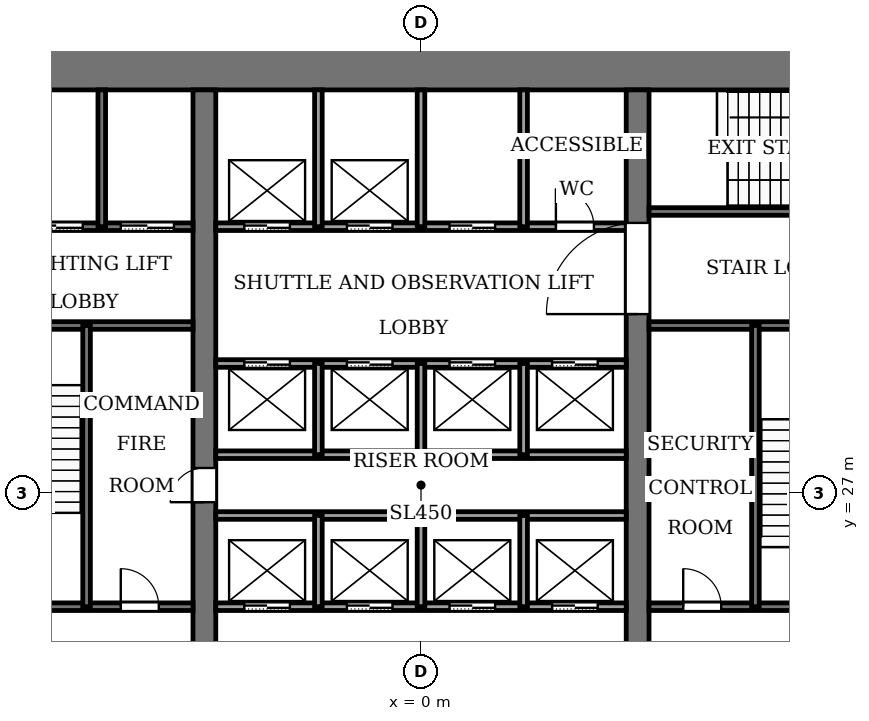
"""IFC4 building model, lengths in metres.
Left out: names, types, materials, properties, quantities, classifications, styles, units other than length and angle.
Written with IfcOpenShell. Run it as: python <this file> out.ifc"""

import sys

from ifc_helpers import new_model, si_unit, direction, frame, frame_2d, origin, place, context, subcontext, project, spatial, rectangle, extrude, element, fill, save


model = new_model("IFC4")
c1 = context("Model", 3, precision=1e-05, world=origin(), true_north=direction((0.0, 1.0)))
c2 = subcontext(c1, "Body", "Model", "MODEL_VIEW")
j1 = project(units=[si_unit("LENGTHUNIT", "METRE"), si_unit("PLANEANGLEUNIT", "RADIAN")], contexts=[c1])
p1 = place(None, origin())
s1 = spatial("IfcSite", under=j1, at=p1, CompositionType="ELEMENT")
p2 = place(p1, origin())
s2 = spatial("IfcBuilding", under=s1, at=p2, CompositionType="ELEMENT")
p3 = place(p2, origin())
s3 = spatial("IfcBuildingStorey", under=s2, at=p3, CompositionType="ELEMENT", Elevation=0.0)
p4 = place(p3, frame((-14.0, 38.3, -0.45), z_axis=(0.0, 0.0, 1.0), x_axis=(1.0, 0.0, 0.0)))
e1 = element("IfcWall", 1, at=p4, inside=s3, PredefinedType="SHEAR", context=c2, shape_type="SweptSolid", body=[
    extrude(rectangle(XDim=28.0, YDim=1.4, at=frame_2d((14.0, 0.0))), origin(), (0.0, 0.0, 1.0), 9.32),
])
p5 = place(p3, frame((-5.7, 18.4, -0.45), z_axis=(0.0, 0.0, 1.0), x_axis=(0.0, 1.0, 0.0)))
e2 = element("IfcWall", 2, at=p5, inside=s3, PredefinedType="SHEAR", context=c2, shape_type="SweptSolid", body=[
    extrude(rectangle(XDim=19.2, YDim=0.6, at=frame_2d((9.6, 0.0))), origin(), (0.0, 0.0, 1.0), 9.32),
])
p6 = place(p5, frame((8.35, 0.0, 0.45)))
e3 = element("IfcOpeningElement", 3, at=p6, cuts=e2, PredefinedType="OPENING", context=c2, shape_type="SweptSolid", body=[
    extrude(rectangle(XDim=0.9, YDim=2.1, at=frame_2d((0.45, 1.05))), frame((0.0, 0.31, 0.0), z_axis=(0.0, -1.0, 0.0), x_axis=(1.0, 0.0, 0.0)), (0.0, 0.0, 1.0), 0.62),
])
p7 = place(p3, frame((5.7, 18.4, -0.45), z_axis=(0.0, 0.0, 1.0), x_axis=(0.0, 1.0, 0.0)))
e4 = element("IfcWall", 4, at=p7, inside=s3, PredefinedType="SHEAR", context=c2, shape_type="SweptSolid", body=[
    extrude(rectangle(XDim=19.2, YDim=0.6, at=frame_2d((9.6, 0.0))), origin(), (0.0, 0.0, 1.0), 9.32),
])
p8 = place(p7, frame((13.3, 0.0, 0.45)))
e5 = element("IfcOpeningElement", 5, at=p8, cuts=e4, PredefinedType="OPENING", context=c2, shape_type="SweptSolid", body=[
    extrude(rectangle(XDim=2.4, YDim=2.4, at=frame_2d((1.2, 1.2))), frame((0.0, 0.31, 0.0), z_axis=(0.0, -1.0, 0.0), x_axis=(1.0, 0.0, 0.0)), (0.0, 0.0, 1.0), 0.62),
])
p9 = place(p3, frame((-12.6, 24.0, 0.0), z_axis=(0.0, 0.0, 1.0), x_axis=(1.0, 0.0, 0.0)))
e6 = element("IfcWall", 6, at=p9, inside=s3, PredefinedType="PARTITIONING", context=c2, shape_type="SweptSolid", body=[
    extrude(rectangle(XDim=6.6, YDim=0.2, at=frame_2d((3.3, 0.0))), origin(), (0.0, 0.0, 1.0), 8.87),
])
p10 = place(p9, frame((4.7, 0.0, 0.0)))
e7 = element("IfcOpeningElement", 7, at=p10, cuts=e6, PredefinedType="OPENING", context=c2, shape_type="SweptSolid", body=[
    extrude(rectangle(XDim=1.0, YDim=2.1, at=frame_2d((0.5, 1.05))), frame((0.0, 0.11, 0.0), z_axis=(0.0, -1.0, 0.0), x_axis=(1.0, 0.0, 0.0)), (0.0, 0.0, 1.0), 0.22),
])
p11 = place(p3, frame((-5.4, 24.0, 0.0), z_axis=(0.0, 0.0, 1.0), x_axis=(1.0, 0.0, 0.0)))
e8 = element("IfcWall", 8, at=p11, inside=s3, PredefinedType="PARTITIONING", context=c2, shape_type="SweptSolid", body=[
    extrude(rectangle(XDim=10.8, YDim=0.2, at=frame_2d((5.4, 0.0))), origin(), (0.0, 0.0, 1.0), 8.87),
])
p12 = place(p11, frame((0.75, 0.0, 0.0)))
e9 = element("IfcOpeningElement", 9, at=p12, cuts=e8, PredefinedType="OPENING", context=c2, shape_type="SweptSolid", body=[
    extrude(rectangle(XDim=1.2, YDim=2.2, at=frame_2d((0.6, 1.1))), frame((0.0, 0.11, 0.0), z_axis=(0.0, -1.0, 0.0), x_axis=(1.0, 0.0, 0.0)), (0.0, 0.0, 1.0), 0.22),
])
p13 = place(p11, frame((3.45, 0.0, 0.0)))
e10 = element("IfcOpeningElement", 10, at=p13, cuts=e8, PredefinedType="OPENING", context=c2, shape_type="SweptSolid", body=[
    extrude(rectangle(XDim=1.2, YDim=2.2, at=frame_2d((0.6, 1.1))), frame((0.0, 0.11, 0.0), z_axis=(0.0, -1.0, 0.0), x_axis=(1.0, 0.0, 0.0)), (0.0, 0.0, 1.0), 0.22),
])
p14 = place(p11, frame((6.15, 0.0, 0.0)))
e11 = element("IfcOpeningElement", 11, at=p14, cuts=e8, PredefinedType="OPENING", context=c2, shape_type="SweptSolid", body=[
    extrude(rectangle(XDim=1.2, YDim=2.2, at=frame_2d((0.6, 1.1))), frame((0.0, 0.11, 0.0), z_axis=(0.0, -1.0, 0.0), x_axis=(1.0, 0.0, 0.0)), (0.0, 0.0, 1.0), 0.22),
])
p15 = place(p11, frame((8.85, 0.0, 0.0)))
e12 = element("IfcOpeningElement", 12, at=p15, cuts=e8, PredefinedType="OPENING", context=c2, shape_type="SweptSolid", body=[
    extrude(rectangle(XDim=1.2, YDim=2.2, at=frame_2d((0.6, 1.1))), frame((0.0, 0.11, 0.0), z_axis=(0.0, -1.0, 0.0), x_axis=(1.0, 0.0, 0.0)), (0.0, 0.0, 1.0), 0.22),
])
p16 = place(p3, frame((6.0, 24.0, 0.0), z_axis=(0.0, 0.0, 1.0), x_axis=(1.0, 0.0, 0.0)))
e13 = element("IfcWall", 13, at=p16, inside=s3, PredefinedType="PARTITIONING", context=c2, shape_type="SweptSolid", body=[
    extrude(rectangle(XDim=6.6, YDim=0.2, at=frame_2d((3.3, 0.0))), origin(), (0.0, 0.0, 1.0), 8.87),
])
p17 = place(p16, frame((0.9, 0.0, 0.0)))
e14 = element("IfcOpeningElement", 14, at=p17, cuts=e13, PredefinedType="OPENING", context=c2, shape_type="SweptSolid", body=[
    extrude(rectangle(XDim=1.0, YDim=2.1, at=frame_2d((0.5, 1.05))), frame((0.0, 0.11, 0.0), z_axis=(0.0, -1.0, 0.0), x_axis=(1.0, 0.0, 0.0)), (0.0, 0.0, 1.0), 0.22),
])
p18 = place(p16, frame((4.4, 0.0, 0.0)))
e15 = element("IfcOpeningElement", 15, at=p18, cuts=e13, PredefinedType="OPENING", context=c2, shape_type="SweptSolid", body=[
    extrude(rectangle(XDim=1.2, YDim=2.2, at=frame_2d((0.6, 1.1))), frame((0.0, 0.11, 0.0), z_axis=(0.0, -1.0, 0.0), x_axis=(1.0, 0.0, 0.0)), (0.0, 0.0, 1.0), 0.22),
])
for number, where, z_axis, x_axis in (
    (16, (-5.4, 26.4, 0.0), (0.0, 0.0, 1.0), (1.0, 0.0, 0.0)),
    (17, (-5.4, 28.0, 0.0), (0.0, 0.0, 1.0), (1.0, 0.0, 0.0)),
):
    element("IfcWall", number, at=place(p3, frame(where, z_axis=z_axis, x_axis=x_axis)), inside=s3, PredefinedType="PARTITIONING", context=c2, shape_type="SweptSolid", body=[
        extrude(rectangle(XDim=10.8, YDim=0.2, at=frame_2d((5.4, 0.0))), origin(), (0.0, 0.0, 1.0), 8.87),
    ])
p19 = place(p3, frame((-5.4, 30.4, 0.0), z_axis=(0.0, 0.0, 1.0), x_axis=(1.0, 0.0, 0.0)))
e18 = element("IfcWall", 18, at=p19, inside=s3, PredefinedType="PARTITIONING", context=c2, shape_type="SweptSolid", body=[
    extrude(rectangle(XDim=10.8, YDim=0.2, at=frame_2d((5.4, 0.0))), origin(), (0.0, 0.0, 1.0), 8.87),
])
p20 = place(p19, frame((0.75, 0.0, 0.0)))
e19 = element("IfcOpeningElement", 19, at=p20, cuts=e18, PredefinedType="OPENING", context=c2, shape_type="SweptSolid", body=[
    extrude(rectangle(XDim=1.2, YDim=2.2, at=frame_2d((0.6, 1.1))), frame((0.0, 0.11, 0.0), z_axis=(0.0, -1.0, 0.0), x_axis=(1.0, 0.0, 0.0)), (0.0, 0.0, 1.0), 0.22),
])
p21 = place(p19, frame((3.45, 0.0, 0.0)))
e20 = element("IfcOpeningElement", 20, at=p21, cuts=e18, PredefinedType="OPENING", context=c2, shape_type="SweptSolid", body=[
    extrude(rectangle(XDim=1.2, YDim=2.2, at=frame_2d((0.6, 1.1))), frame((0.0, 0.11, 0.0), z_axis=(0.0, -1.0, 0.0), x_axis=(1.0, 0.0, 0.0)), (0.0, 0.0, 1.0), 0.22),
])
p22 = place(p19, frame((6.15, 0.0, 0.0)))
e21 = element("IfcOpeningElement", 21, at=p22, cuts=e18, PredefinedType="OPENING", context=c2, shape_type="SweptSolid", body=[
    extrude(rectangle(XDim=1.2, YDim=2.2, at=frame_2d((0.6, 1.1))), frame((0.0, 0.11, 0.0), z_axis=(0.0, -1.0, 0.0), x_axis=(1.0, 0.0, 0.0)), (0.0, 0.0, 1.0), 0.22),
])
p23 = place(p19, frame((8.85, 0.0, 0.0)))
e22 = element("IfcOpeningElement", 22, at=p23, cuts=e18, PredefinedType="OPENING", context=c2, shape_type="SweptSolid", body=[
    extrude(rectangle(XDim=1.2, YDim=2.2, at=frame_2d((0.6, 1.1))), frame((0.0, 0.11, 0.0), z_axis=(0.0, -1.0, 0.0), x_axis=(1.0, 0.0, 0.0)), (0.0, 0.0, 1.0), 0.22),
])
p24 = place(p3, frame((-12.6, 31.4, 0.0), z_axis=(0.0, 0.0, 1.0), x_axis=(1.0, 0.0, 0.0)))
e23 = element("IfcWall", 23, at=p24, inside=s3, PredefinedType="PARTITIONING", context=c2, shape_type="SweptSolid", body=[
    extrude(rectangle(XDim=6.6, YDim=0.2, at=frame_2d((3.3, 0.0))), origin(), (0.0, 0.0, 1.0), 8.87),
])
p25 = place(p24, frame((1.0, 0.0, 0.0)))
e24 = element("IfcOpeningElement", 24, at=p25, cuts=e23, PredefinedType="OPENING", context=c2, shape_type="SweptSolid", body=[
    extrude(rectangle(XDim=1.2, YDim=2.2, at=frame_2d((0.6, 1.1))), frame((0.0, 0.11, 0.0), z_axis=(0.0, -1.0, 0.0), x_axis=(1.0, 0.0, 0.0)), (0.0, 0.0, 1.0), 0.22),
])
p26 = place(p3, frame((6.0, 31.4, 0.0), z_axis=(0.0, 0.0, 1.0), x_axis=(1.0, 0.0, 0.0)))
e25 = element("IfcWall", 25, at=p26, inside=s3, PredefinedType="PARTITIONING", context=c2, shape_type="SweptSolid", body=[
    extrude(rectangle(XDim=6.6, YDim=0.2, at=frame_2d((3.3, 0.0))), origin(), (0.0, 0.0, 1.0), 8.87),
])
p27 = place(p3, frame((-12.6, 34.0, 0.0), z_axis=(0.0, 0.0, 1.0), x_axis=(1.0, 0.0, 0.0)))
e26 = element("IfcWall", 26, at=p27, inside=s3, PredefinedType="PARTITIONING", context=c2, shape_type="SweptSolid", body=[
    extrude(rectangle(XDim=6.6, YDim=0.2, at=frame_2d((3.3, 0.0))), origin(), (0.0, 0.0, 1.0), 8.87),
])
p28 = place(p27, frame((4.7, 0.0, 0.0)))
e27 = element("IfcOpeningElement", 27, at=p28, cuts=e26, PredefinedType="OPENING", context=c2, shape_type="SweptSolid", body=[
    extrude(rectangle(XDim=1.4, YDim=2.2, at=frame_2d((0.7, 1.1))), frame((0.0, 0.11, 0.0), z_axis=(0.0, -1.0, 0.0), x_axis=(1.0, 0.0, 0.0)), (0.0, 0.0, 1.0), 0.22),
])
p29 = place(p27, frame((2.3, 0.0, 0.0)))
e28 = element("IfcOpeningElement", 28, at=p29, cuts=e26, PredefinedType="OPENING", context=c2, shape_type="SweptSolid", body=[
    extrude(rectangle(XDim=1.4, YDim=2.2, at=frame_2d((0.7, 1.1))), frame((0.0, 0.11, 0.0), z_axis=(0.0, -1.0, 0.0), x_axis=(1.0, 0.0, 0.0)), (0.0, 0.0, 1.0), 0.22),
])
p30 = place(p27, frame((0.45, 0.0, 0.0)))
e29 = element("IfcOpeningElement", 29, at=p30, cuts=e26, PredefinedType="OPENING", context=c2, shape_type="SweptSolid", body=[
    extrude(rectangle(XDim=0.9, YDim=2.1, at=frame_2d((0.45, 1.05))), frame((0.0, 0.11, 0.0), z_axis=(0.0, -1.0, 0.0), x_axis=(1.0, 0.0, 0.0)), (0.0, 0.0, 1.0), 0.22),
])
p31 = place(p3, frame((-5.4, 34.0, 0.0), z_axis=(0.0, 0.0, 1.0), x_axis=(1.0, 0.0, 0.0)))
e30 = element("IfcWall", 30, at=p31, inside=s3, PredefinedType="PARTITIONING", context=c2, shape_type="SweptSolid", body=[
    extrude(rectangle(XDim=10.8, YDim=0.2, at=frame_2d((5.4, 0.0))), origin(), (0.0, 0.0, 1.0), 8.87),
])
p32 = place(p31, frame((0.75, 0.0, 0.0)))
e31 = element("IfcOpeningElement", 31, at=p32, cuts=e30, PredefinedType="OPENING", context=c2, shape_type="SweptSolid", body=[
    extrude(rectangle(XDim=1.2, YDim=2.2, at=frame_2d((0.6, 1.1))), frame((0.0, 0.11, 0.0), z_axis=(0.0, -1.0, 0.0), x_axis=(1.0, 0.0, 0.0)), (0.0, 0.0, 1.0), 0.22),
])
p33 = place(p31, frame((3.45, 0.0, 0.0)))
e32 = element("IfcOpeningElement", 32, at=p33, cuts=e30, PredefinedType="OPENING", context=c2, shape_type="SweptSolid", body=[
    extrude(rectangle(XDim=1.2, YDim=2.2, at=frame_2d((0.6, 1.1))), frame((0.0, 0.11, 0.0), z_axis=(0.0, -1.0, 0.0), x_axis=(1.0, 0.0, 0.0)), (0.0, 0.0, 1.0), 0.22),
])
p34 = place(p31, frame((6.15, 0.0, 0.0)))
e33 = element("IfcOpeningElement", 33, at=p34, cuts=e30, PredefinedType="OPENING", context=c2, shape_type="SweptSolid", body=[
    extrude(rectangle(XDim=1.2, YDim=2.2, at=frame_2d((0.6, 1.1))), frame((0.0, 0.11, 0.0), z_axis=(0.0, -1.0, 0.0), x_axis=(1.0, 0.0, 0.0)), (0.0, 0.0, 1.0), 0.22),
])
p35 = place(p31, frame((8.95, 0.0, 0.0)))
e34 = element("IfcOpeningElement", 34, at=p35, cuts=e30, PredefinedType="OPENING", context=c2, shape_type="SweptSolid", body=[
    extrude(rectangle(XDim=1.0, YDim=2.1, at=frame_2d((0.5, 1.05))), frame((0.0, 0.11, 0.0), z_axis=(0.0, -1.0, 0.0), x_axis=(1.0, 0.0, 0.0)), (0.0, 0.0, 1.0), 0.22),
])
p36 = place(p3, frame((6.0, 34.4, 0.0), z_axis=(0.0, 0.0, 1.0), x_axis=(1.0, 0.0, 0.0)))
e35 = element("IfcWall", 35, at=p36, inside=s3, PredefinedType="PARTITIONING", context=c2, shape_type="SweptSolid", body=[
    extrude(rectangle(XDim=6.6, YDim=0.2, at=frame_2d((3.3, 0.0))), origin(), (0.0, 0.0, 1.0), 8.87),
])
p37 = place(p36, frame((4.8, 0.0, 0.0)))
e36 = element("IfcOpeningElement", 36, at=p37, cuts=e35, PredefinedType="OPENING", context=c2, shape_type="SweptSolid", body=[
    extrude(rectangle(XDim=1.2, YDim=2.2, at=frame_2d((0.6, 1.1))), frame((0.0, 0.11, 0.0), z_axis=(0.0, -1.0, 0.0), x_axis=(1.0, 0.0, 0.0)), (0.0, 0.0, 1.0), 0.22),
])
p38 = place(p3, frame((-8.8, 24.0, 0.0), z_axis=(0.0, 0.0, 1.0), x_axis=(0.0, 1.0, 0.0)))
e37 = element("IfcWall", 37, at=p38, inside=s3, PredefinedType="PARTITIONING", context=c2, shape_type="SweptSolid", body=[
    extrude(rectangle(XDim=7.4, YDim=0.2, at=frame_2d((3.7, 0.0))), origin(), (0.0, 0.0, 1.0), 8.87),
])
p39 = place(p3, frame((-8.4, 34.0, 0.0), z_axis=(0.0, 0.0, 1.0), x_axis=(0.0, 1.0, 0.0)))
e38 = element("IfcWall", 38, at=p39, inside=s3, PredefinedType="PARTITIONING", context=c2, shape_type="SweptSolid", body=[
    extrude(rectangle(XDim=3.6, YDim=0.2, at=frame_2d((1.8, 0.0))), origin(), (0.0, 0.0, 1.0), 8.87),
])
for number, where, z_axis, x_axis in (
    (39, (-2.7, 24.0, 0.0), (0.0, 0.0, 1.0), (0.0, 1.0, 0.0)),
    (40, (-2.7, 28.0, 0.0), (0.0, 0.0, 1.0), (0.0, 1.0, 0.0)),
):
    element("IfcWall", number, at=place(p3, frame(where, z_axis=z_axis, x_axis=x_axis)), inside=s3, PredefinedType="PARTITIONING", context=c2, shape_type="SweptSolid", body=[
        extrude(rectangle(XDim=2.4, YDim=0.2, at=frame_2d((1.2, 0.0))), origin(), (0.0, 0.0, 1.0), 8.87),
    ])
p40 = place(p3, frame((-2.7, 34.0, 0.0), z_axis=(0.0, 0.0, 1.0), x_axis=(0.0, 1.0, 0.0)))
e41 = element("IfcWall", 41, at=p40, inside=s3, PredefinedType="PARTITIONING", context=c2, shape_type="SweptSolid", body=[
    extrude(rectangle(XDim=3.6, YDim=0.2, at=frame_2d((1.8, 0.0))), origin(), (0.0, 0.0, 1.0), 8.87),
])
for number, where, z_axis, x_axis in (
    (42, (0.0, 24.0, 0.0), (0.0, 0.0, 1.0), (0.0, 1.0, 0.0)),
    (43, (0.0, 28.0, 0.0), (0.0, 0.0, 1.0), (0.0, 1.0, 0.0)),
):
    element("IfcWall", number, at=place(p3, frame(where, z_axis=z_axis, x_axis=x_axis)), inside=s3, PredefinedType="PARTITIONING", context=c2, shape_type="SweptSolid", body=[
        extrude(rectangle(XDim=2.4, YDim=0.2, at=frame_2d((1.2, 0.0))), origin(), (0.0, 0.0, 1.0), 8.87),
    ])
p41 = place(p3, frame((0.0, 34.0, 0.0), z_axis=(0.0, 0.0, 1.0), x_axis=(0.0, 1.0, 0.0)))
e44 = element("IfcWall", 44, at=p41, inside=s3, PredefinedType="PARTITIONING", context=c2, shape_type="SweptSolid", body=[
    extrude(rectangle(XDim=3.6, YDim=0.2, at=frame_2d((1.8, 0.0))), origin(), (0.0, 0.0, 1.0), 8.87),
])
for number, where, z_axis, x_axis in (
    (45, (2.7, 24.0, 0.0), (0.0, 0.0, 1.0), (0.0, 1.0, 0.0)),
    (46, (2.7, 28.0, 0.0), (0.0, 0.0, 1.0), (0.0, 1.0, 0.0)),
):
    element("IfcWall", number, at=place(p3, frame(where, z_axis=z_axis, x_axis=x_axis)), inside=s3, PredefinedType="PARTITIONING", context=c2, shape_type="SweptSolid", body=[
        extrude(rectangle(XDim=2.4, YDim=0.2, at=frame_2d((1.2, 0.0))), origin(), (0.0, 0.0, 1.0), 8.87),
    ])
p42 = place(p3, frame((2.7, 34.0, 0.0), z_axis=(0.0, 0.0, 1.0), x_axis=(0.0, 1.0, 0.0)))
e47 = element("IfcWall", 47, at=p42, inside=s3, PredefinedType="PARTITIONING", context=c2, shape_type="SweptSolid", body=[
    extrude(rectangle(XDim=3.6, YDim=0.2, at=frame_2d((1.8, 0.0))), origin(), (0.0, 0.0, 1.0), 8.87),
])
p43 = place(p3, frame((8.8, 24.0, 0.0), z_axis=(0.0, 0.0, 1.0), x_axis=(0.0, 1.0, 0.0)))
e48 = element("IfcWall", 48, at=p43, inside=s3, PredefinedType="PARTITIONING", context=c2, shape_type="SweptSolid", body=[
    extrude(rectangle(XDim=7.4, YDim=0.2, at=frame_2d((3.7, 0.0))), origin(), (0.0, 0.0, 1.0), 8.87),
])
p44 = place(p12, origin())
e49 = element("IfcDoor", 49, at=p44, inside=s3, OperationType="SLIDING_TO_LEFT", PredefinedType="DOOR", context=c2, shape_type="SweptSolid", body=[
    extrude(rectangle(XDim=1.2, YDim=2.2, at=frame_2d((0.6, 1.1))), frame((0.0, 0.025, 0.0), z_axis=(0.0, -1.0, 0.0), x_axis=(1.0, 0.0, 0.0)), (0.0, 0.0, 1.0), 0.05),
])
fill(e9, e49)
p45 = place(p13, origin())
e50 = element("IfcDoor", 50, at=p45, inside=s3, OperationType="SLIDING_TO_LEFT", PredefinedType="DOOR", context=c2, shape_type="SweptSolid", body=[
    extrude(rectangle(XDim=1.2, YDim=2.2, at=frame_2d((0.6, 1.1))), frame((0.0, 0.025, 0.0), z_axis=(0.0, -1.0, 0.0), x_axis=(1.0, 0.0, 0.0)), (0.0, 0.0, 1.0), 0.05),
])
fill(e10, e50)
p46 = place(p14, origin())
e51 = element("IfcDoor", 51, at=p46, inside=s3, OperationType="SLIDING_TO_LEFT", PredefinedType="DOOR", context=c2, shape_type="SweptSolid", body=[
    extrude(rectangle(XDim=1.2, YDim=2.2, at=frame_2d((0.6, 1.1))), frame((0.0, 0.025, 0.0), z_axis=(0.0, -1.0, 0.0), x_axis=(1.0, 0.0, 0.0)), (0.0, 0.0, 1.0), 0.05),
])
fill(e11, e51)
p47 = place(p15, origin())
e52 = element("IfcDoor", 52, at=p47, inside=s3, OperationType="SLIDING_TO_LEFT", PredefinedType="DOOR", context=c2, shape_type="SweptSolid", body=[
    extrude(rectangle(XDim=1.2, YDim=2.2, at=frame_2d((0.6, 1.1))), frame((0.0, 0.025, 0.0), z_axis=(0.0, -1.0, 0.0), x_axis=(1.0, 0.0, 0.0)), (0.0, 0.0, 1.0), 0.05),
])
fill(e12, e52)
p48 = place(p20, origin())
e53 = element("IfcDoor", 53, at=p48, inside=s3, OperationType="SLIDING_TO_LEFT", PredefinedType="DOOR", context=c2, shape_type="SweptSolid", body=[
    extrude(rectangle(XDim=1.2, YDim=2.2, at=frame_2d((0.6, 1.1))), frame((0.0, 0.025, 0.0), z_axis=(0.0, -1.0, 0.0), x_axis=(1.0, 0.0, 0.0)), (0.0, 0.0, 1.0), 0.05),
])
fill(e19, e53)
p49 = place(p21, origin())
e54 = element("IfcDoor", 54, at=p49, inside=s3, OperationType="SLIDING_TO_LEFT", PredefinedType="DOOR", context=c2, shape_type="SweptSolid", body=[
    extrude(rectangle(XDim=1.2, YDim=2.2, at=frame_2d((0.6, 1.1))), frame((0.0, 0.025, 0.0), z_axis=(0.0, -1.0, 0.0), x_axis=(1.0, 0.0, 0.0)), (0.0, 0.0, 1.0), 0.05),
])
fill(e20, e54)
p50 = place(p22, origin())
e55 = element("IfcDoor", 55, at=p50, inside=s3, OperationType="SLIDING_TO_LEFT", PredefinedType="DOOR", context=c2, shape_type="SweptSolid", body=[
    extrude(rectangle(XDim=1.2, YDim=2.2, at=frame_2d((0.6, 1.1))), frame((0.0, 0.025, 0.0), z_axis=(0.0, -1.0, 0.0), x_axis=(1.0, 0.0, 0.0)), (0.0, 0.0, 1.0), 0.05),
])
fill(e21, e55)
p51 = place(p23, origin())
e56 = element("IfcDoor", 56, at=p51, inside=s3, OperationType="SLIDING_TO_LEFT", PredefinedType="DOOR", context=c2, shape_type="SweptSolid", body=[
    extrude(rectangle(XDim=1.2, YDim=2.2, at=frame_2d((0.6, 1.1))), frame((0.0, 0.025, 0.0), z_axis=(0.0, -1.0, 0.0), x_axis=(1.0, 0.0, 0.0)), (0.0, 0.0, 1.0), 0.05),
])
fill(e22, e56)
p52 = place(p32, origin())
e57 = element("IfcDoor", 57, at=p52, inside=s3, OperationType="SLIDING_TO_LEFT", PredefinedType="DOOR", context=c2, shape_type="SweptSolid", body=[
    extrude(rectangle(XDim=1.2, YDim=2.2, at=frame_2d((0.6, 1.1))), frame((0.0, 0.025, 0.0), z_axis=(0.0, -1.0, 0.0), x_axis=(1.0, 0.0, 0.0)), (0.0, 0.0, 1.0), 0.05),
])
fill(e31, e57)
p53 = place(p33, origin())
e58 = element("IfcDoor", 58, at=p53, inside=s3, OperationType="SLIDING_TO_LEFT", PredefinedType="DOOR", context=c2, shape_type="SweptSolid", body=[
    extrude(rectangle(XDim=1.2, YDim=2.2, at=frame_2d((0.6, 1.1))), frame((0.0, 0.025, 0.0), z_axis=(0.0, -1.0, 0.0), x_axis=(1.0, 0.0, 0.0)), (0.0, 0.0, 1.0), 0.05),
])
fill(e32, e58)
p54 = place(p34, origin())
e59 = element("IfcDoor", 59, at=p54, inside=s3, OperationType="SLIDING_TO_LEFT", PredefinedType="DOOR", context=c2, shape_type="SweptSolid", body=[
    extrude(rectangle(XDim=1.2, YDim=2.2, at=frame_2d((0.6, 1.1))), frame((0.0, 0.025, 0.0), z_axis=(0.0, -1.0, 0.0), x_axis=(1.0, 0.0, 0.0)), (0.0, 0.0, 1.0), 0.05),
])
fill(e33, e59)
p55 = place(p28, origin())
e60 = element("IfcDoor", 60, at=p55, inside=s3, OperationType="SLIDING_TO_LEFT", PredefinedType="DOOR", context=c2, shape_type="SweptSolid", body=[
    extrude(rectangle(XDim=1.4, YDim=2.2, at=frame_2d((0.7, 1.1))), frame((0.0, 0.025, 0.0), z_axis=(0.0, -1.0, 0.0), x_axis=(1.0, 0.0, 0.0)), (0.0, 0.0, 1.0), 0.05),
])
fill(e27, e60)
p56 = place(p29, origin())
e61 = element("IfcDoor", 61, at=p56, inside=s3, OperationType="SLIDING_TO_LEFT", PredefinedType="DOOR", context=c2, shape_type="SweptSolid", body=[
    extrude(rectangle(XDim=1.4, YDim=2.2, at=frame_2d((0.7, 1.1))), frame((0.0, 0.025, 0.0), z_axis=(0.0, -1.0, 0.0), x_axis=(1.0, 0.0, 0.0)), (0.0, 0.0, 1.0), 0.05),
])
fill(e28, e61)
p57 = place(p10, origin())
e62 = element("IfcDoor", 62, at=p57, inside=s3, OperationType="SINGLE_SWING_RIGHT", PredefinedType="DOOR", context=c2, shape_type="SweptSolid", body=[
    extrude(rectangle(XDim=1.0, YDim=2.1, at=frame_2d((0.5, 1.05))), frame((0.0, 0.025, 0.0), z_axis=(0.0, -1.0, 0.0), x_axis=(1.0, 0.0, 0.0)), (0.0, 0.0, 1.0), 0.05),
])
fill(e7, e62)
p58 = place(p17, origin())
e63 = element("IfcDoor", 63, at=p58, inside=s3, OperationType="SINGLE_SWING_LEFT", PredefinedType="DOOR", context=c2, shape_type="SweptSolid", body=[
    extrude(rectangle(XDim=1.0, YDim=2.1, at=frame_2d((0.5, 1.05))), frame((0.0, 0.025, 0.0), z_axis=(0.0, -1.0, 0.0), x_axis=(1.0, 0.0, 0.0)), (0.0, 0.0, 1.0), 0.05),
])
fill(e14, e63)
p59 = place(p35, origin())
e64 = element("IfcDoor", 64, at=p59, inside=s3, OperationType="SINGLE_SWING_LEFT", PredefinedType="DOOR", context=c2, shape_type="SweptSolid", body=[
    extrude(rectangle(XDim=1.0, YDim=2.1, at=frame_2d((0.5, 1.05))), frame((0.0, 0.025, 0.0), z_axis=(0.0, -1.0, 0.0), x_axis=(1.0, 0.0, 0.0)), (0.0, 0.0, 1.0), 0.05),
])
fill(e34, e64)
p60 = place(p6, origin())
e65 = element("IfcDoor", 65, at=p60, inside=s3, OperationType="SINGLE_SWING_RIGHT", PredefinedType="DOOR", context=c2, shape_type="SweptSolid", body=[
    extrude(rectangle(XDim=0.9, YDim=2.1, at=frame_2d((0.45, 1.05))), frame((0.0, 0.025, 0.0), z_axis=(0.0, -1.0, 0.0), x_axis=(1.0, 0.0, 0.0)), (0.0, 0.0, 1.0), 0.05),
])
fill(e3, e65)
p61 = place(p8, origin())
e66 = element("IfcDoor", 66, at=p61, inside=s3, OperationType="DOUBLE_DOOR_SINGLE_SWING", PredefinedType="DOOR", context=c2, shape_type="SweptSolid", body=[
    extrude(rectangle(XDim=2.4, YDim=2.4, at=frame_2d((1.2, 1.2))), frame((0.0, 0.025, 0.0), z_axis=(0.0, -1.0, 0.0), x_axis=(1.0, 0.0, 0.0)), (0.0, 0.0, 1.0), 0.05),
])
fill(e5, e66)
save(model, sys.argv[1])
